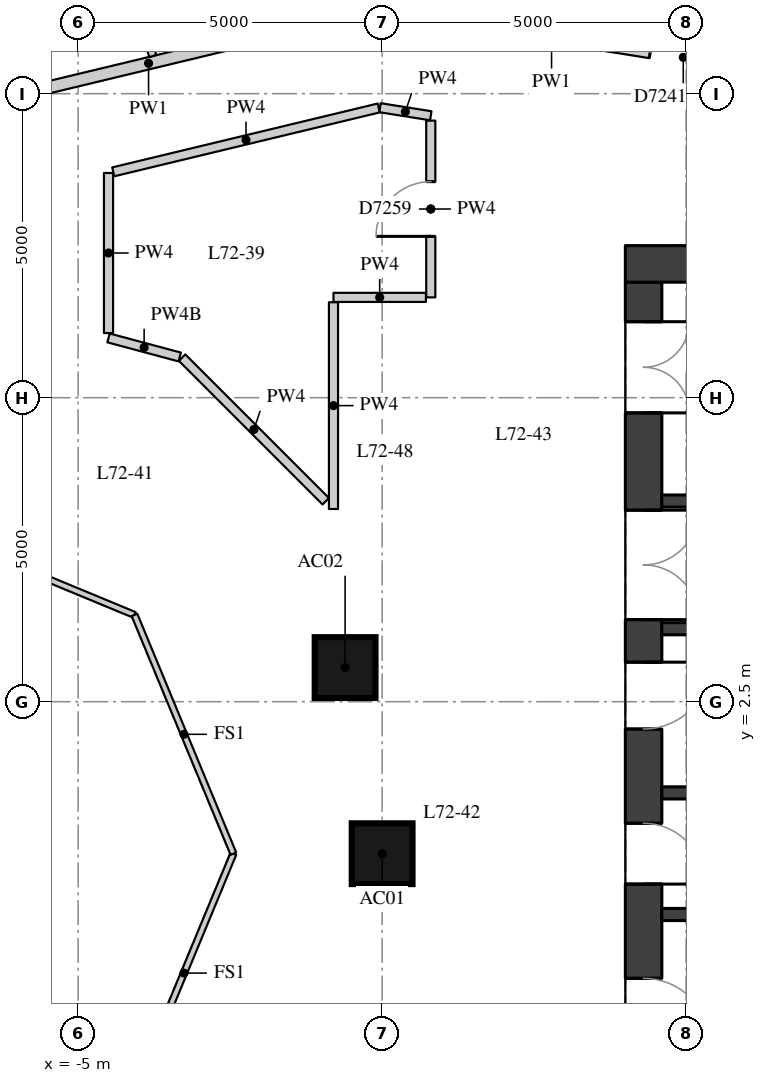
"""IFC4 building model, lengths in metres.
Left out: names, types, materials, properties, quantities, classifications, styles, units other than length and angle.
Written with IfcOpenShell. Run it as: python <this file> out.ifc"""

import sys

from ifc_helpers import new_model, si_unit, direction, frame, frame_2d, origin, origin_2d, place, context, subcontext, project, spatial, rectangle, extrude, element, fill, save


model = new_model("IFC4")
c1 = context("Model", 3, precision=1e-05, world=origin(), true_north=direction((0.0, 1.0)))
c2 = subcontext(c1, "Body", "Model", "MODEL_VIEW")
j1 = project(units=[si_unit("LENGTHUNIT", "METRE"), si_unit("PLANEANGLEUNIT", "RADIAN")], contexts=[c1])
p1 = place(None, origin())
s1 = spatial("IfcSite", under=j1, at=p1, CompositionType="ELEMENT")
p2 = place(p1, origin())
s2 = spatial("IfcBuilding", under=s1, at=p2, CompositionType="ELEMENT")
p3 = place(p2, frame((0.0, 0.0, 253.1)))
s3 = spatial("IfcBuildingStorey", under=s2, at=p3, CompositionType="ELEMENT", Elevation=253.1)
for number, where, z_axis, x_axis in (
    (1, (0.0, 0.0, 0.0), (0.0, 0.0, 1.0), (1.0, 0.0, 0.0)),
    (2, (-0.609, 3.062, 0.0), (0.0, 0.0, 1.0), (1.0, 0.0, 0.0)),
):
    element("IfcColumn", number, at=place(p3, frame(where, z_axis=z_axis, x_axis=x_axis)), inside=s3, PredefinedType="COLUMN", context=c2, shape_type="SweptSolid", body=[
        extrude(rectangle(XDim=1.0, YDim=1.0, at=origin_2d()), origin(), (0.0, 0.0, 1.0), 3.3),
    ])
p4 = place(p3, frame((4.3, -9.4, 0.0), z_axis=(0.0, 0.0, 1.0), x_axis=(0.0, 1.0, 0.0)))
e3 = element("IfcWall", 3, at=p4, inside=s3, PredefinedType="SHEAR", context=c2, shape_type="SweptSolid", body=[
    extrude(rectangle(XDim=18.8, YDim=0.6, at=frame_2d((9.4, 0.0))), origin(), (0.0, 0.0, 1.0), 3.02),
])
p5 = place(p4, frame((0.65, 0.0, 0.0)))
e4 = element("IfcOpeningElement", 4, at=p5, cuts=e3, PredefinedType="OPENING", context=c2, shape_type="SweptSolid", body=[
    extrude(rectangle(XDim=1.5, YDim=2.1, at=frame_2d((0.75, 1.05))), frame((0.0, 0.31, 0.0), z_axis=(0.0, -1.0, 0.0), x_axis=(1.0, 0.0, 0.0)), (0.0, 0.0, 1.0), 0.62),
])
p6 = place(p4, frame((3.75, 0.0, 0.0)))
e5 = element("IfcOpeningElement", 5, at=p6, cuts=e3, PredefinedType="OPENING", context=c2, shape_type="SweptSolid", body=[
    extrude(rectangle(XDim=1.8, YDim=2.1, at=frame_2d((0.9, 1.05))), frame((0.0, 0.31, 0.0), z_axis=(0.0, -1.0, 0.0), x_axis=(1.0, 0.0, 0.0)), (0.0, 0.0, 1.0), 0.62),
])
p7 = place(p4, frame((6.25, 0.0, 0.0)))
e6 = element("IfcOpeningElement", 6, at=p7, cuts=e3, PredefinedType="OPENING", context=c2, shape_type="SweptSolid", body=[
    extrude(rectangle(XDim=1.1, YDim=2.1, at=frame_2d((0.55, 1.05))), frame((0.0, 0.31, 0.0), z_axis=(0.0, -1.0, 0.0), x_axis=(1.0, 0.0, 0.0)), (0.0, 0.0, 1.0), 0.62),
])
p8 = place(p4, frame((8.9, 0.0, 0.0)))
e7 = element("IfcOpeningElement", 7, at=p8, cuts=e3, PredefinedType="OPENING", context=c2, shape_type="SweptSolid", body=[
    extrude(rectangle(XDim=1.0, YDim=2.1, at=frame_2d((0.5, 1.05))), frame((0.0, 0.31, 0.0), z_axis=(0.0, -1.0, 0.0), x_axis=(1.0, 0.0, 0.0)), (0.0, 0.0, 1.0), 0.62),
])
p9 = place(p4, frame((11.45, 0.0, 0.0)))
e8 = element("IfcOpeningElement", 8, at=p9, cuts=e3, PredefinedType="OPENING", context=c2, shape_type="SweptSolid", body=[
    extrude(rectangle(XDim=1.1, YDim=2.1, at=frame_2d((0.55, 1.05))), frame((0.0, 0.31, 0.0), z_axis=(0.0, -1.0, 0.0), x_axis=(1.0, 0.0, 0.0)), (0.0, 0.0, 1.0), 0.62),
])
p10 = place(p4, frame((13.25, 0.0, 0.0)))
e9 = element("IfcOpeningElement", 9, at=p10, cuts=e3, PredefinedType="OPENING", context=c2, shape_type="SweptSolid", body=[
    extrude(rectangle(XDim=1.8, YDim=2.1, at=frame_2d((0.9, 1.05))), frame((0.0, 0.31, 0.0), z_axis=(0.0, -1.0, 0.0), x_axis=(1.0, 0.0, 0.0)), (0.0, 0.0, 1.0), 0.62),
])
p11 = place(p4, frame((16.65, 0.0, 0.0)))
e10 = element("IfcOpeningElement", 10, at=p11, cuts=e3, PredefinedType="OPENING", context=c2, shape_type="SweptSolid", body=[
    extrude(rectangle(XDim=1.5, YDim=2.1, at=frame_2d((0.75, 1.05))), frame((0.0, 0.31, 0.0), z_axis=(0.0, -1.0, 0.0), x_axis=(1.0, 0.0, 0.0)), (0.0, 0.0, 1.0), 0.62),
])
p12 = place(p3, frame((4.0, 9.7, 0.0), z_axis=(0.0, 0.0, 1.0), x_axis=(1.0, 0.0, 0.0)))
e11 = element("IfcWall", 11, at=p12, inside=s3, PredefinedType="SHEAR", context=c2, shape_type="SweptSolid", body=[
    extrude(rectangle(XDim=12.0, YDim=0.6, at=frame_2d((6.0, 0.0))), origin(), (0.0, 0.0, 1.0), 3.02),
])
p13 = place(p3, frame((4.6, 5.8, 0.0), z_axis=(0.0, 0.0, 1.0), x_axis=(1.0, 0.0, 0.0)))
e12 = element("IfcWall", 12, at=p13, inside=s3, PredefinedType="SHEAR", context=c2, shape_type="SweptSolid", body=[
    extrude(rectangle(XDim=10.8, YDim=0.2, at=frame_2d((5.4, 0.0))), origin(), (0.0, 0.0, 1.0), 3.02),
])
p14 = place(p13, frame((7.05, 0.0, 0.0)))
e13 = element("IfcOpeningElement", 13, at=p14, cuts=e12, PredefinedType="OPENING", context=c2, shape_type="SweptSolid", body=[
    extrude(rectangle(XDim=1.1, YDim=2.1, at=frame_2d((0.55, 1.05))), frame((0.0, 0.11, 0.0), z_axis=(0.0, -1.0, 0.0), x_axis=(1.0, 0.0, 0.0)), (0.0, 0.0, 1.0), 0.22),
])
p15 = place(p13, frame((9.05, 0.0, 0.0)))
e14 = element("IfcOpeningElement", 14, at=p15, cuts=e12, PredefinedType="OPENING", context=c2, shape_type="SweptSolid", body=[
    extrude(rectangle(XDim=1.1, YDim=2.1, at=frame_2d((0.55, 1.05))), frame((0.0, 0.11, 0.0), z_axis=(0.0, -1.0, 0.0), x_axis=(1.0, 0.0, 0.0)), (0.0, 0.0, 1.0), 0.22),
])
p16 = place(p3, frame((4.6, 3.7, 0.0), z_axis=(0.0, 0.0, 1.0), x_axis=(1.0, 0.0, 0.0)))
e15 = element("IfcWall", 15, at=p16, inside=s3, PredefinedType="SHEAR", context=c2, shape_type="SweptSolid", body=[
    extrude(rectangle(XDim=10.8, YDim=0.2, at=frame_2d((5.4, 0.0))), origin(), (0.0, 0.0, 1.0), 3.02),
])
p17 = place(p16, frame((6.6, 0.0, 0.0)))
e16 = element("IfcOpeningElement", 16, at=p17, cuts=e15, PredefinedType="OPENING", context=c2, shape_type="SweptSolid", body=[
    extrude(rectangle(XDim=1.1, YDim=2.1, at=frame_2d((0.55, 1.05))), frame((0.0, 0.11, 0.0), z_axis=(0.0, -1.0, 0.0), x_axis=(1.0, 0.0, 0.0)), (0.0, 0.0, 1.0), 0.22),
])
p18 = place(p16, frame((8.9, 0.0, 0.0)))
e17 = element("IfcOpeningElement", 17, at=p18, cuts=e15, PredefinedType="OPENING", context=c2, shape_type="SweptSolid", body=[
    extrude(rectangle(XDim=1.1, YDim=2.1, at=frame_2d((0.55, 1.05))), frame((0.0, 0.11, 0.0), z_axis=(0.0, -1.0, 0.0), x_axis=(1.0, 0.0, 0.0)), (0.0, 0.0, 1.0), 0.22),
])
for number, where, z_axis, x_axis in (
    (18, (4.6, 1.0, 0.0), (0.0, 0.0, 1.0), (1.0, 0.0, 0.0)),
    (19, (4.6, -1.0, 0.0), (0.0, 0.0, 1.0), (1.0, 0.0, 0.0)),
):
    element("IfcWall", number, at=place(p3, frame(where, z_axis=z_axis, x_axis=x_axis)), inside=s3, PredefinedType="SHEAR", context=c2, shape_type="SweptSolid", body=[
        extrude(rectangle(XDim=10.8, YDim=0.2, at=frame_2d((5.4, 0.0))), origin(), (0.0, 0.0, 1.0), 3.02),
    ])
p19 = place(p3, frame((-7.583, 12.1, 0.0), z_axis=(0.0, 0.0, 1.0), x_axis=(0.97226305798, 0.233890029903, 0.0)))
e20 = element("IfcWall", 20, at=p19, inside=s3, PredefinedType="PARTITIONING", context=c2, shape_type="SweptSolid", body=[
    extrude(rectangle(XDim=7.696, YDim=0.2, at=frame_2d((3.848, 0.0))), origin(), (0.0, 0.0, 1.0), 3.02),
])
p20 = place(p19, frame((5.85, 0.0, 0.0)))
e21 = element("IfcOpeningElement", 21, at=p20, cuts=e20, PredefinedType="OPENING", context=c2, shape_type="SweptSolid", body=[
    extrude(rectangle(XDim=1.1, YDim=2.1, at=frame_2d((0.55, 1.05))), frame((0.0, 0.11, 0.0), z_axis=(0.0, -1.0, 0.0), x_axis=(1.0, 0.0, 0.0)), (0.0, 0.0, 1.0), 0.22),
])
p21 = place(p19, frame((0.399, 0.0, 0.0)))
e22 = element("IfcOpeningElement", 22, at=p21, cuts=e20, PredefinedType="OPENING", context=c2, shape_type="SweptSolid", body=[
    extrude(rectangle(XDim=0.9, YDim=2.1, at=frame_2d((0.45, 1.05))), frame((0.0, 0.11, 0.0), z_axis=(0.0, -1.0, 0.0), x_axis=(1.0, 0.0, 0.0)), (0.0, 0.0, 1.0), 0.22),
])
p22 = place(p3, frame((-0.061, 13.894, 0.0), z_axis=(0.0, 0.0, 1.0), x_axis=(0.987623870558, -0.156840971383, 0.0)))
e23 = element("IfcWall", 23, at=p22, inside=s3, PredefinedType="PARTITIONING", context=c2, shape_type="SweptSolid", body=[
    extrude(rectangle(XDim=5.766, YDim=0.2, at=frame_2d((2.883, 0.0))), origin(), (0.0, 0.0, 1.0), 3.02),
])
p23 = place(p22, frame((4.526, 0.0, 0.0)))
e24 = element("IfcOpeningElement", 24, at=p23, cuts=e23, PredefinedType="OPENING", context=c2, shape_type="SweptSolid", body=[
    extrude(rectangle(XDim=1.1, YDim=2.1, at=frame_2d((0.55, 1.05))), frame((0.0, 0.11, 0.0), z_axis=(0.0, -1.0, 0.0), x_axis=(1.0, 0.0, 0.0)), (0.0, 0.0, 1.0), 0.22),
])
p24 = place(p3, frame((-0.036, 12.27, 0.0), z_axis=(0.0, 0.0, 1.0), x_axis=(0.987612834354, -0.156910450318, 0.0)))
e25 = element("IfcWall", 25, at=p24, inside=s3, PredefinedType="PARTITIONING", context=c2, shape_type="SweptSolid", body=[
    extrude(rectangle(XDim=0.846, YDim=0.15, at=frame_2d((0.423, 0.0))), origin(), (0.0, 0.0, 1.0), 3.02),
])
p25 = place(p3, frame((0.8, 12.057, 0.0), z_axis=(0.0, 0.0, 1.0), x_axis=(0.0, -1.0, 0.0)))
e26 = element("IfcWall", 26, at=p25, inside=s3, PredefinedType="PARTITIONING", context=c2, shape_type="SweptSolid", body=[
    extrude(rectangle(XDim=2.907, YDim=0.15, at=frame_2d((1.454, 0.0))), origin(), (0.0, 0.0, 1.0), 3.02),
])
p26 = place(p25, frame((1.003, 0.0, 0.0)))
e27 = element("IfcOpeningElement", 27, at=p26, cuts=e26, PredefinedType="OPENING", context=c2, shape_type="SweptSolid", body=[
    extrude(rectangle(XDim=0.9, YDim=2.1, at=frame_2d((0.45, 1.05))), frame((0.0, 0.085, 0.0), z_axis=(0.0, -1.0, 0.0), x_axis=(1.0, 0.0, 0.0)), (0.0, 0.0, 1.0), 0.17),
])
p27 = place(p3, frame((0.72, 9.15, 0.0), z_axis=(0.0, 0.0, 1.0), x_axis=(-1.0, 0.0, 0.0)))
e28 = element("IfcWall", 28, at=p27, inside=s3, PredefinedType="PARTITIONING", context=c2, shape_type="SweptSolid", body=[
    extrude(rectangle(XDim=1.52, YDim=0.15, at=frame_2d((0.76, 0.0))), origin(), (0.0, 0.0, 1.0), 3.02),
])
p28 = place(p3, frame((-0.8, 9.07, 0.0), z_axis=(0.0, 0.0, 1.0), x_axis=(0.0, -1.0, 0.0)))
e29 = element("IfcWall", 29, at=p28, inside=s3, PredefinedType="PARTITIONING", context=c2, shape_type="SweptSolid", body=[
    extrude(rectangle(XDim=3.4, YDim=0.15, at=frame_2d((1.7, 0.0))), origin(), (0.0, 0.0, 1.0), 3.02),
])
p29 = place(p3, frame((-0.927, 5.797, 0.0), z_axis=(0.0, 0.0, 1.0), x_axis=(-0.707106781187, 0.707106781187, 0.0)))
e30 = element("IfcWall", 30, at=p29, inside=s3, PredefinedType="PARTITIONING", context=c2, shape_type="SweptSolid", body=[
    extrude(rectangle(XDim=3.341, YDim=0.15, at=frame_2d((1.67, 0.0))), origin(), (0.0, 0.0, 1.0), 3.02),
])
p30 = place(p3, frame((-3.328, 8.169, 0.0), z_axis=(0.0, 0.0, 1.0), x_axis=(-0.965933680277, 0.258789731841, 0.0)))
e31 = element("IfcWall", 31, at=p30, inside=s3, PredefinedType="PARTITIONING", context=c2, shape_type="SweptSolid", body=[
    extrude(rectangle(XDim=1.213, YDim=0.15, at=frame_2d((0.606, 0.0))), origin(), (0.0, 0.0, 1.0), 2.47),
])
p31 = place(p3, frame((-4.5, 8.563, 0.0), z_axis=(0.0, 0.0, 1.0), x_axis=(0.0, 1.0, 0.0)))
e32 = element("IfcWall", 32, at=p31, inside=s3, PredefinedType="PARTITIONING", context=c2, shape_type="SweptSolid", body=[
    extrude(rectangle(XDim=2.633, YDim=0.15, at=frame_2d((1.316, 0.0))), origin(), (0.0, 0.0, 1.0), 3.02),
])
p32 = place(p3, frame((-4.422, 11.215, 0.0), z_axis=(0.0, 0.0, 1.0), x_axis=(0.972256385538, 0.233917764997, 0.0)))
e33 = element("IfcWall", 33, at=p32, inside=s3, PredefinedType="PARTITIONING", context=c2, shape_type="SweptSolid", body=[
    extrude(rectangle(XDim=4.491, YDim=0.15, at=frame_2d((2.246, 0.0))), origin(), (0.0, 0.0, 1.0), 3.02),
])
p33 = place(p3, frame((-3.771, 13.12, 0.0), z_axis=(0.0, 0.0, 1.0), x_axis=(-0.312336886671, 0.949971404425, 0.0)))
e34 = element("IfcWall", 34, at=p33, inside=s3, PredefinedType="PARTITIONING", context=c2, shape_type="SweptSolid", body=[
    extrude(rectangle(XDim=2.863, YDim=0.12, at=frame_2d((1.432, 0.0))), origin(), (0.0, 0.0, 1.0), 3.02),
])
for number, where, z_axis, x_axis in (
    (35, (-2.446, 0.0, 0.0), (0.0, 0.0, 1.0), (-0.383, -0.924, 0.0)),
    (36, (-8.0, 5.554, 0.0), (0.0, 0.0, 1.0), (0.924, -0.383, 0.0)),
    (37, (-4.073, 3.927, 0.0), (0.0, 0.0, 1.0), (0.383, -0.924, 0.0)),
):
    element("IfcWall", number, at=place(p3, frame(where, z_axis=z_axis, x_axis=x_axis)), inside=s3, PredefinedType="PARTITIONING", context=c2, shape_type="SweptSolid", body=[
        extrude(rectangle(XDim=4.251, YDim=0.1, at=frame_2d((2.125, 0.0))), origin(), (0.0, 0.0, 1.0), 3.02),
    ])
p34 = place(p7, origin())
e38 = element("IfcDoor", 38, at=p34, inside=s3, OperationType="SINGLE_SWING_RIGHT", PredefinedType="DOOR", context=c2, shape_type="SweptSolid", body=[
    extrude(rectangle(XDim=1.1, YDim=2.1, at=frame_2d((0.55, 1.05))), frame((0.0, 0.025, 0.0), z_axis=(0.0, -1.0, 0.0), x_axis=(1.0, 0.0, 0.0)), (0.0, 0.0, 1.0), 0.05),
])
fill(e6, e38)
p35 = place(p8, origin())
e39 = element("IfcDoor", 39, at=p35, inside=s3, OperationType="SINGLE_SWING_RIGHT", PredefinedType="DOOR", context=c2, shape_type="SweptSolid", body=[
    extrude(rectangle(XDim=1.0, YDim=2.1, at=frame_2d((0.5, 1.05))), frame((0.0, 0.025, 0.0), z_axis=(0.0, -1.0, 0.0), x_axis=(1.0, 0.0, 0.0)), (0.0, 0.0, 1.0), 0.05),
])
fill(e7, e39)
p36 = place(p9, origin())
e40 = element("IfcDoor", 40, at=p36, inside=s3, OperationType="SINGLE_SWING_LEFT", PredefinedType="DOOR", context=c2, shape_type="SweptSolid", body=[
    extrude(rectangle(XDim=1.1, YDim=2.1, at=frame_2d((0.55, 1.05))), frame((0.0, 0.025, 0.0), z_axis=(0.0, -1.0, 0.0), x_axis=(1.0, 0.0, 0.0)), (0.0, 0.0, 1.0), 0.05),
])
fill(e8, e40)
p37 = place(p10, origin())
e41 = element("IfcDoor", 41, at=p37, inside=s3, OperationType="DOUBLE_DOOR_SINGLE_SWING", PredefinedType="DOOR", context=c2, shape_type="SweptSolid", body=[
    extrude(rectangle(XDim=1.8, YDim=2.1, at=frame_2d((0.9, 1.05))), frame((0.0, 0.025, 0.0), z_axis=(0.0, -1.0, 0.0), x_axis=(1.0, 0.0, 0.0)), (0.0, 0.0, 1.0), 0.05),
])
fill(e9, e41)
p38 = place(p11, origin())
e42 = element("IfcDoor", 42, at=p38, inside=s3, OperationType="DOUBLE_DOOR_SINGLE_SWING", PredefinedType="DOOR", context=c2, shape_type="SweptSolid", body=[
    extrude(rectangle(XDim=1.5, YDim=2.1, at=frame_2d((0.75, 1.05))), frame((0.0, 0.025, 0.0), z_axis=(0.0, -1.0, 0.0), x_axis=(1.0, 0.0, 0.0)), (0.0, 0.0, 1.0), 0.05),
])
fill(e10, e42)
p39 = place(p23, origin())
e43 = element("IfcDoor", 43, at=p39, inside=s3, OperationType="SINGLE_SWING_RIGHT", PredefinedType="DOOR", context=c2, shape_type="SweptSolid", body=[
    extrude(rectangle(XDim=1.1, YDim=2.1, at=frame_2d((0.55, 1.05))), frame((0.0, 0.025, 0.0), z_axis=(0.0, -1.0, 0.0), x_axis=(1.0, 0.0, 0.0)), (0.0, 0.0, 1.0), 0.05),
])
fill(e24, e43)
p40 = place(p26, origin())
e44 = element("IfcDoor", 44, at=p40, inside=s3, OperationType="SINGLE_SWING_LEFT", PredefinedType="DOOR", context=c2, shape_type="SweptSolid", body=[
    extrude(rectangle(XDim=0.9, YDim=2.1, at=frame_2d((0.45, 1.05))), frame((0.0, 0.025, 0.0), z_axis=(0.0, -1.0, 0.0), x_axis=(1.0, 0.0, 0.0)), (0.0, 0.0, 1.0), 0.05),
])
fill(e27, e44)
save(model, sys.argv[1])
